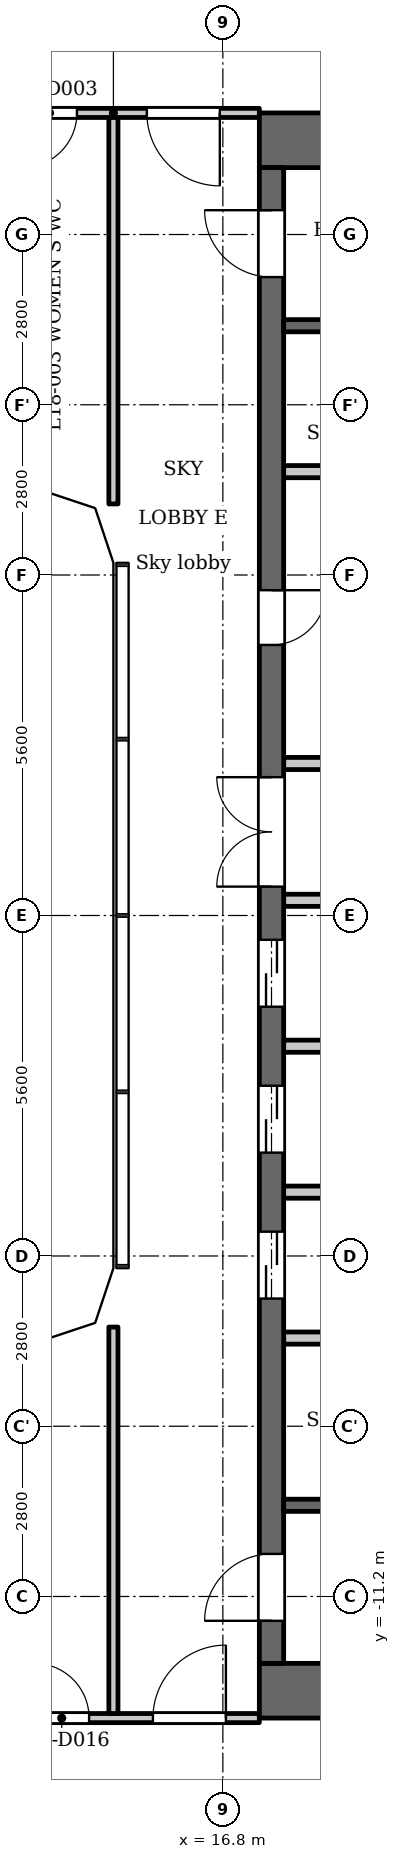
"""IFC4 building model, lengths in metres.
Left out: names, types, materials, properties, quantities, classifications, styles, units other than length and angle.
Written with IfcOpenShell. Run it as: python <this file> out.ifc"""

import sys

from ifc_helpers import new_model, si_unit, direction, frame, frame_2d, origin, place, context, subcontext, project, spatial, polyline, rectangle, outline, extrude, element, fill, save


model = new_model("IFC4")
c1 = context("Model", 3, precision=1e-05, world=origin(), true_north=direction((0.0, 1.0)))
c2 = subcontext(c1, "Body", "Model", "MODEL_VIEW")
j1 = project(units=[si_unit("LENGTHUNIT", "METRE"), si_unit("PLANEANGLEUNIT", "RADIAN")], contexts=[c1])
p1 = place(None, origin())
s1 = spatial("IfcSite", under=j1, at=p1, CompositionType="ELEMENT")
p2 = place(p1, origin())
s2 = spatial("IfcBuilding", under=s1, at=p2, CompositionType="ELEMENT")
p3 = place(p2, frame((0.0, 0.0, 72.5)))
s3 = spatial("IfcBuildingStorey", under=s2, at=p3, CompositionType="ELEMENT", Elevation=72.5)
for number, where, z_axis, x_axis in (
    (1, (17.4, 12.75, 0.0), (0.0, 0.0, 1.0), (1.0, 0.0, 0.0)),
    (2, (17.4, -12.75, 0.0), (0.0, 0.0, 1.0), (1.0, 0.0, 0.0)),
):
    element("IfcWall", number, at=place(p3, frame(where, z_axis=z_axis, x_axis=x_axis)), inside=s3, PredefinedType="SHEAR", context=c2, shape_type="SweptSolid", body=[
        extrude(rectangle(XDim=10.4, YDim=0.9, at=frame_2d((5.2, 0.0))), origin(), (0.0, 0.0, 1.0), 4.95),
    ])
p4 = place(p3, frame((17.6, -12.3, 0.0), z_axis=(0.0, 0.0, 1.0), x_axis=(0.0, 1.0, 0.0)))
e3 = element("IfcWall", 3, at=p4, inside=s3, PredefinedType="SHEAR", context=c2, shape_type="SweptSolid", body=[
    extrude(rectangle(XDim=24.6, YDim=0.4, at=frame_2d((12.3, 0.0))), origin(), (0.0, 0.0, 1.0), 4.95),
])
p5 = place(p4, frame((6.0, 0.0, 0.0)))
e4 = element("IfcOpeningElement", 4, at=p5, cuts=e3, PredefinedType="OPENING", context=c2, shape_type="SweptSolid", body=[
    extrude(rectangle(XDim=1.1, YDim=2.1, at=frame_2d((0.55, 1.05))), frame((0.0, 0.21, 0.0), z_axis=(0.0, -1.0, 0.0), x_axis=(1.0, 0.0, 0.0)), (0.0, 0.0, 1.0), 0.42),
])
p6 = place(p4, frame((8.4, 0.0, 0.0)))
e5 = element("IfcOpeningElement", 5, at=p6, cuts=e3, PredefinedType="OPENING", context=c2, shape_type="SweptSolid", body=[
    extrude(rectangle(XDim=1.1, YDim=2.1, at=frame_2d((0.55, 1.05))), frame((0.0, 0.21, 0.0), z_axis=(0.0, -1.0, 0.0), x_axis=(1.0, 0.0, 0.0)), (0.0, 0.0, 1.0), 0.42),
])
p7 = place(p4, frame((10.8, 0.0, 0.0)))
e6 = element("IfcOpeningElement", 6, at=p7, cuts=e3, PredefinedType="OPENING", context=c2, shape_type="SweptSolid", body=[
    extrude(rectangle(XDim=1.1, YDim=2.1, at=frame_2d((0.55, 1.05))), frame((0.0, 0.21, 0.0), z_axis=(0.0, -1.0, 0.0), x_axis=(1.0, 0.0, 0.0)), (0.0, 0.0, 1.0), 0.42),
])
p8 = place(p4, frame((16.75, 0.0, 0.0)))
e7 = element("IfcOpeningElement", 7, at=p8, cuts=e3, PredefinedType="OPENING", context=c2, shape_type="SweptSolid", body=[
    extrude(rectangle(XDim=0.9, YDim=2.1, at=frame_2d((0.45, 1.05))), frame((0.0, 0.21, 0.0), z_axis=(0.0, -1.0, 0.0), x_axis=(1.0, 0.0, 0.0)), (0.0, 0.0, 1.0), 0.42),
])
p9 = place(p4, frame((22.8, 0.0, 0.0)))
e8 = element("IfcOpeningElement", 8, at=p9, cuts=e3, PredefinedType="OPENING", context=c2, shape_type="SweptSolid", body=[
    extrude(rectangle(XDim=1.1, YDim=2.1, at=frame_2d((0.55, 1.05))), frame((0.0, 0.21, 0.0), z_axis=(0.0, -1.0, 0.0), x_axis=(1.0, 0.0, 0.0)), (0.0, 0.0, 1.0), 0.42),
])
p10 = place(p4, frame((0.7, 0.0, 0.0)))
e9 = element("IfcOpeningElement", 9, at=p10, cuts=e3, PredefinedType="OPENING", context=c2, shape_type="SweptSolid", body=[
    extrude(rectangle(XDim=1.1, YDim=2.1, at=frame_2d((0.55, 1.05))), frame((0.0, 0.21, 0.0), z_axis=(0.0, -1.0, 0.0), x_axis=(1.0, 0.0, 0.0)), (0.0, 0.0, 1.0), 0.42),
])
p11 = place(p4, frame((12.775, 0.0, 0.0)))
e10 = element("IfcOpeningElement", 10, at=p11, cuts=e3, PredefinedType="OPENING", context=c2, shape_type="SweptSolid", body=[
    extrude(rectangle(XDim=1.8, YDim=2.1, at=frame_2d((0.9, 1.05))), frame((0.0, 0.21, 0.0), z_axis=(0.0, -1.0, 0.0), x_axis=(1.0, 0.0, 0.0)), (0.0, 0.0, 1.0), 0.42),
])
p12 = place(p3, frame((17.8, -9.7, 0.0), z_axis=(0.0, 0.0, 1.0), x_axis=(1.0, 0.0, 0.0)))
e11 = element("IfcWall", 11, at=p12, inside=s3, PredefinedType="SHEAR", context=c2, shape_type="SweptSolid", body=[
    extrude(rectangle(XDim=8.3, YDim=0.2, at=frame_2d((4.15, 0.0))), origin(), (0.0, 0.0, 1.0), 4.95),
])
p13 = place(p12, frame((0.85, 0.0, 0.0)))
e12 = element("IfcOpeningElement", 12, at=p13, cuts=e11, PredefinedType="OPENING", context=c2, shape_type="SweptSolid", body=[
    extrude(rectangle(XDim=1.1, YDim=2.1, at=frame_2d((0.55, 1.05))), frame((0.0, 0.11, 0.0), z_axis=(0.0, -1.0, 0.0), x_axis=(1.0, 0.0, 0.0)), (0.0, 0.0, 1.0), 0.22),
])
p14 = place(p12, frame((3.75, 0.0, 0.0)))
e13 = element("IfcOpeningElement", 13, at=p14, cuts=e11, PredefinedType="OPENING", context=c2, shape_type="SweptSolid", body=[
    extrude(rectangle(XDim=1.1, YDim=2.1, at=frame_2d((0.55, 1.05))), frame((0.0, 0.11, 0.0), z_axis=(0.0, -1.0, 0.0), x_axis=(1.0, 0.0, 0.0)), (0.0, 0.0, 1.0), 0.22),
])
for number, where, z_axis, x_axis in (
    (14, (17.8, -6.95, 0.0), (0.0, 0.0, 1.0), (1.0, 0.0, 0.0)),
    (15, (17.8, -4.55, 0.0), (0.0, 0.0, 1.0), (1.0, 0.0, 0.0)),
    (16, (17.8, -2.15, 0.0), (0.0, 0.0, 1.0), (1.0, 0.0, 0.0)),
):
    element("IfcWall", number, at=place(p3, frame(where, z_axis=z_axis, x_axis=x_axis)), inside=s3, PredefinedType="PARTITIONING", context=c2, shape_type="SweptSolid", body=[
        extrude(rectangle(XDim=2.8, YDim=0.2, at=frame_2d((1.4, 0.0))), origin(), (0.0, 0.0, 1.0), 4.95),
    ])
for number, where, z_axis, x_axis in (
    (17, (17.8, 0.25, 0.0), (0.0, 0.0, 1.0), (1.0, 0.0, 0.0)),
    (18, (17.8, 2.5, 0.0), (0.0, 0.0, 1.0), (1.0, 0.0, 0.0)),
):
    element("IfcWall", number, at=place(p3, frame(where, z_axis=z_axis, x_axis=x_axis)), inside=s3, PredefinedType="PARTITIONING", context=c2, shape_type="SweptSolid", body=[
        extrude(rectangle(XDim=3.0, YDim=0.2, at=frame_2d((1.5, 0.0))), origin(), (0.0, 0.0, 1.0), 4.95),
    ])
p15 = place(p3, frame((17.8, 7.3, 0.0), z_axis=(0.0, 0.0, 1.0), x_axis=(1.0, 0.0, 0.0)))
e19 = element("IfcWall", 19, at=p15, inside=s3, PredefinedType="PARTITIONING", context=c2, shape_type="SweptSolid", body=[
    extrude(rectangle(XDim=2.8, YDim=0.2, at=frame_2d((1.4, 0.0))), origin(), (0.0, 0.0, 1.0), 4.95),
])
p16 = place(p3, frame((17.8, 9.7, 0.0), z_axis=(0.0, 0.0, 1.0), x_axis=(1.0, 0.0, 0.0)))
e20 = element("IfcWall", 20, at=p16, inside=s3, PredefinedType="SHEAR", context=c2, shape_type="SweptSolid", body=[
    extrude(rectangle(XDim=8.3, YDim=0.2, at=frame_2d((4.15, 0.0))), origin(), (0.0, 0.0, 1.0), 4.95),
])
p17 = place(p16, frame((0.85, 0.0, 0.0)))
e21 = element("IfcOpeningElement", 21, at=p17, cuts=e20, PredefinedType="OPENING", context=c2, shape_type="SweptSolid", body=[
    extrude(rectangle(XDim=1.1, YDim=2.1, at=frame_2d((0.55, 1.05))), frame((0.0, 0.11, 0.0), z_axis=(0.0, -1.0, 0.0), x_axis=(1.0, 0.0, 0.0)), (0.0, 0.0, 1.0), 0.22),
])
p18 = place(p16, frame((3.75, 0.0, 0.0)))
e22 = element("IfcOpeningElement", 22, at=p18, cuts=e20, PredefinedType="OPENING", context=c2, shape_type="SweptSolid", body=[
    extrude(rectangle(XDim=1.1, YDim=2.1, at=frame_2d((0.55, 1.05))), frame((0.0, 0.11, 0.0), z_axis=(0.0, -1.0, 0.0), x_axis=(1.0, 0.0, 0.0)), (0.0, 0.0, 1.0), 0.22),
])
p19 = place(p3, frame((11.384, -13.2, 0.0), z_axis=(0.0, 0.0, 1.0), x_axis=(1.0, 0.0, 0.0)))
e23 = element("IfcWall", 23, at=p19, inside=s3, PredefinedType="PARTITIONING", context=c2, shape_type="SweptSolid", body=[
    extrude(rectangle(XDim=6.016, YDim=0.15, at=frame_2d((3.008, 0.0))), origin(), (0.0, 0.0, 1.0), 4.95),
])
p20 = place(p19, frame((4.266, 0.0, 0.0)))
e24 = element("IfcOpeningElement", 24, at=p20, cuts=e23, PredefinedType="OPENING", context=c2, shape_type="SweptSolid", body=[
    extrude(rectangle(XDim=1.2, YDim=2.1, at=frame_2d((0.6, 1.05))), frame((0.0, 0.085, 0.0), z_axis=(0.0, -1.0, 0.0), x_axis=(1.0, 0.0, 0.0)), (0.0, 0.0, 1.0), 0.17),
])
p21 = place(p19, frame((0.416, 0.0, 0.0)))
e25 = element("IfcOpeningElement", 25, at=p21, cuts=e23, PredefinedType="OPENING", context=c2, shape_type="SweptSolid", body=[
    extrude(rectangle(XDim=0.9, YDim=2.1, at=frame_2d((0.45, 1.05))), frame((0.0, 0.085, 0.0), z_axis=(0.0, -1.0, 0.0), x_axis=(1.0, 0.0, 0.0)), (0.0, 0.0, 1.0), 0.17),
])
p22 = place(p19, frame((2.316, 0.0, 0.0)))
e26 = element("IfcOpeningElement", 26, at=p22, cuts=e23, PredefinedType="OPENING", context=c2, shape_type="SweptSolid", body=[
    extrude(rectangle(XDim=0.9, YDim=2.1, at=frame_2d((0.45, 1.05))), frame((0.0, 0.085, 0.0), z_axis=(0.0, -1.0, 0.0), x_axis=(1.0, 0.0, 0.0)), (0.0, 0.0, 1.0), 0.17),
])
p23 = place(p3, frame((11.384, 13.2, 0.0), z_axis=(0.0, 0.0, 1.0), x_axis=(1.0, 0.0, 0.0)))
e27 = element("IfcWall", 27, at=p23, inside=s3, PredefinedType="PARTITIONING", context=c2, shape_type="SweptSolid", body=[
    extrude(rectangle(XDim=6.016, YDim=0.15, at=frame_2d((3.008, 0.0))), origin(), (0.0, 0.0, 1.0), 4.95),
])
p24 = place(p23, frame((4.166, 0.0, 0.0)))
e28 = element("IfcOpeningElement", 28, at=p24, cuts=e27, PredefinedType="OPENING", context=c2, shape_type="SweptSolid", body=[
    extrude(rectangle(XDim=1.2, YDim=2.1, at=frame_2d((0.6, 1.05))), frame((0.0, 0.085, 0.0), z_axis=(0.0, -1.0, 0.0), x_axis=(1.0, 0.0, 0.0)), (0.0, 0.0, 1.0), 0.17),
])
p25 = place(p23, frame((0.306, 0.0, 0.0)))
e29 = element("IfcOpeningElement", 29, at=p25, cuts=e27, PredefinedType="OPENING", context=c2, shape_type="SweptSolid", body=[
    extrude(rectangle(XDim=0.9, YDim=2.1, at=frame_2d((0.45, 1.05))), frame((0.0, 0.085, 0.0), z_axis=(0.0, -1.0, 0.0), x_axis=(1.0, 0.0, 0.0)), (0.0, 0.0, 1.0), 0.17),
])
p26 = place(p23, frame((2.116, 0.0, 0.0)))
e30 = element("IfcOpeningElement", 30, at=p26, cuts=e27, PredefinedType="OPENING", context=c2, shape_type="SweptSolid", body=[
    extrude(rectangle(XDim=0.9, YDim=2.1, at=frame_2d((0.45, 1.05))), frame((0.0, 0.085, 0.0), z_axis=(0.0, -1.0, 0.0), x_axis=(1.0, 0.0, 0.0)), (0.0, 0.0, 1.0), 0.17),
])
for number, where, z_axis, x_axis in (
    (31, (15.0, -13.125, 0.0), (0.0, 0.0, 1.0), (0.0, 1.0, 0.0)),
    (32, (15.0, 6.769, 0.0), (0.0, 0.0, 1.0), (0.0, 1.0, 0.0)),
):
    element("IfcWall", number, at=place(p3, frame(where, z_axis=z_axis, x_axis=x_axis)), inside=s3, PredefinedType="PARTITIONING", context=c2, shape_type="SweptSolid", body=[
        extrude(rectangle(XDim=6.356, YDim=0.15, at=frame_2d((3.178, 0.0))), origin(), (0.0, 0.0, 1.0), 4.95),
    ])
p27 = place(p3, origin())
e33 = element("IfcWall", 33, at=p27, inside=s3, PredefinedType="SOLIDWALL", context=c2, shape_type="SweptSolid", body=[
    extrude(outline(polyline([(13.8, 7.0), (14.7, 6.7), (15.0, 5.8), (15.3, 5.8), (15.3, 5.849), (14.937, 6.937), (13.849, 7.3), (13.8, 7.3), (13.8, 7.0)])), origin(), (0.0, 0.0, 1.0), 4.95),
])
e34 = element("IfcWall", 34, at=p27, inside=s3, PredefinedType="SOLIDWALL", context=c2, shape_type="SweptSolid", body=[
    extrude(outline(polyline([(15.0, -5.8), (14.7, -6.7), (13.8, -7.0), (13.8, -7.3), (13.849, -7.3), (14.937, -6.937), (15.3, -5.849), (15.3, -5.8), (15.0, -5.8)])), origin(), (0.0, 0.0, 1.0), 4.95),
])
p28 = place(p5, origin())
e35 = element("IfcDoor", 35, at=p28, inside=s3, OperationType="DOUBLE_DOOR_SLIDING", PredefinedType="DOOR", context=c2, shape_type="SweptSolid", body=[
    extrude(rectangle(XDim=1.1, YDim=2.1, at=frame_2d((0.55, 1.05))), frame((0.0, 0.025, 0.0), z_axis=(0.0, -1.0, 0.0), x_axis=(1.0, 0.0, 0.0)), (0.0, 0.0, 1.0), 0.05),
])
fill(e4, e35)
p29 = place(p6, origin())
e36 = element("IfcDoor", 36, at=p29, inside=s3, OperationType="DOUBLE_DOOR_SLIDING", PredefinedType="DOOR", context=c2, shape_type="SweptSolid", body=[
    extrude(rectangle(XDim=1.1, YDim=2.1, at=frame_2d((0.55, 1.05))), frame((0.0, 0.025, 0.0), z_axis=(0.0, -1.0, 0.0), x_axis=(1.0, 0.0, 0.0)), (0.0, 0.0, 1.0), 0.05),
])
fill(e5, e36)
p30 = place(p7, origin())
e37 = element("IfcDoor", 37, at=p30, inside=s3, OperationType="DOUBLE_DOOR_SLIDING", PredefinedType="DOOR", context=c2, shape_type="SweptSolid", body=[
    extrude(rectangle(XDim=1.1, YDim=2.1, at=frame_2d((0.55, 1.05))), frame((0.0, 0.025, 0.0), z_axis=(0.0, -1.0, 0.0), x_axis=(1.0, 0.0, 0.0)), (0.0, 0.0, 1.0), 0.05),
])
fill(e6, e37)
p31 = place(p8, origin())
e38 = element("IfcDoor", 38, at=p31, inside=s3, OperationType="SINGLE_SWING_RIGHT", PredefinedType="DOOR", context=c2, shape_type="SweptSolid", body=[
    extrude(rectangle(XDim=0.9, YDim=2.1, at=frame_2d((0.45, 1.05))), frame((0.0, 0.025, 0.0), z_axis=(0.0, -1.0, 0.0), x_axis=(1.0, 0.0, 0.0)), (0.0, 0.0, 1.0), 0.05),
])
fill(e7, e38)
p32 = place(p9, origin())
e39 = element("IfcDoor", 39, at=p32, inside=s3, OperationType="SINGLE_SWING_LEFT", PredefinedType="DOOR", context=c2, shape_type="SweptSolid", body=[
    extrude(rectangle(XDim=1.1, YDim=2.1, at=frame_2d((0.55, 1.05))), frame((0.0, 0.025, 0.0), z_axis=(0.0, -1.0, 0.0), x_axis=(1.0, 0.0, 0.0)), (0.0, 0.0, 1.0), 0.05),
])
fill(e8, e39)
p33 = place(p10, origin())
e40 = element("IfcDoor", 40, at=p33, inside=s3, OperationType="SINGLE_SWING_RIGHT", PredefinedType="DOOR", context=c2, shape_type="SweptSolid", body=[
    extrude(rectangle(XDim=1.1, YDim=2.1, at=frame_2d((0.55, 1.05))), frame((0.0, 0.025, 0.0), z_axis=(0.0, -1.0, 0.0), x_axis=(1.0, 0.0, 0.0)), (0.0, 0.0, 1.0), 0.05),
])
fill(e9, e40)
p34 = place(p11, origin())
e41 = element("IfcDoor", 41, at=p34, inside=s3, OperationType="DOUBLE_DOOR_SINGLE_SWING", PredefinedType="DOOR", context=c2, shape_type="SweptSolid", body=[
    extrude(rectangle(XDim=1.8, YDim=2.1, at=frame_2d((0.9, 1.05))), frame((0.0, 0.025, 0.0), z_axis=(0.0, -1.0, 0.0), x_axis=(1.0, 0.0, 0.0)), (0.0, 0.0, 1.0), 0.05),
])
fill(e10, e41)
p35 = place(p24, origin())
e42 = element("IfcDoor", 42, at=p35, inside=s3, OperationType="SINGLE_SWING_RIGHT", PredefinedType="DOOR", context=c2, shape_type="SweptSolid", body=[
    extrude(rectangle(XDim=1.2, YDim=2.1, at=frame_2d((0.6, 1.05))), frame((0.0, 0.025, 0.0), z_axis=(0.0, -1.0, 0.0), x_axis=(1.0, 0.0, 0.0)), (0.0, 0.0, 1.0), 0.05),
])
fill(e28, e42)
p36 = place(p26, origin())
e43 = element("IfcDoor", 43, at=p36, inside=s3, OperationType="SINGLE_SWING_LEFT", PredefinedType="DOOR", context=c2, shape_type="SweptSolid", body=[
    extrude(rectangle(XDim=0.9, YDim=2.1, at=frame_2d((0.45, 1.05))), frame((0.0, 0.025, 0.0), z_axis=(0.0, -1.0, 0.0), x_axis=(1.0, 0.0, 0.0)), (0.0, 0.0, 1.0), 0.05),
])
fill(e30, e43)
p37 = place(p20, origin())
e44 = element("IfcDoor", 44, at=p37, inside=s3, OperationType="SINGLE_SWING_LEFT", PredefinedType="DOOR", context=c2, shape_type="SweptSolid", body=[
    extrude(rectangle(XDim=1.2, YDim=2.1, at=frame_2d((0.6, 1.05))), frame((0.0, 0.025, 0.0), z_axis=(0.0, -1.0, 0.0), x_axis=(1.0, 0.0, 0.0)), (0.0, 0.0, 1.0), 0.05),
])
fill(e24, e44)
p38 = place(p22, origin())
e45 = element("IfcDoor", 45, at=p38, inside=s3, OperationType="SINGLE_SWING_RIGHT", PredefinedType="DOOR", context=c2, shape_type="SweptSolid", body=[
    extrude(rectangle(XDim=0.9, YDim=2.1, at=frame_2d((0.45, 1.05))), frame((0.0, 0.025, 0.0), z_axis=(0.0, -1.0, 0.0), x_axis=(1.0, 0.0, 0.0)), (0.0, 0.0, 1.0), 0.05),
])
fill(e26, e45)
save(model, sys.argv[1])
